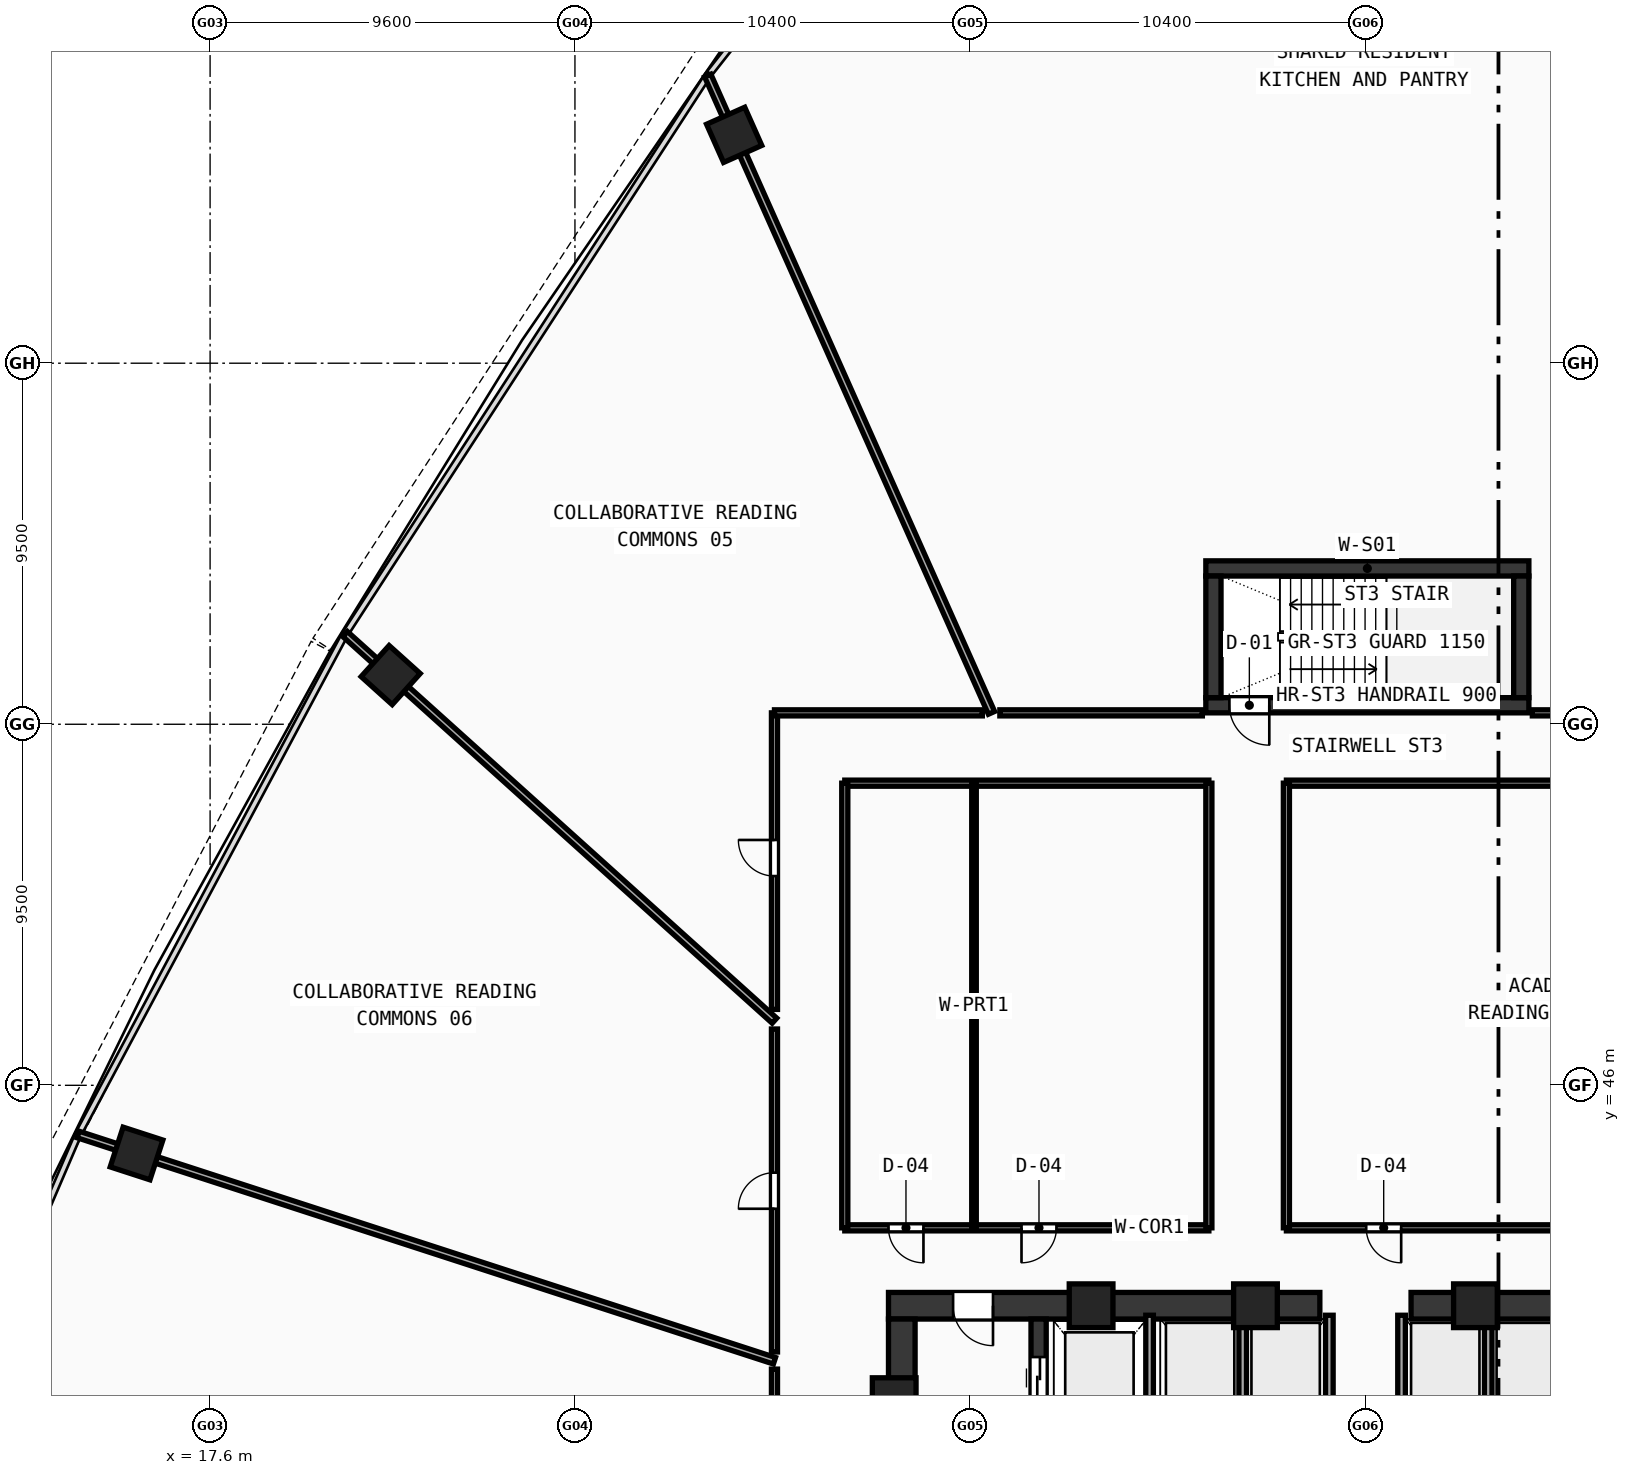
"""IFC4 building model, lengths in metres.
Left out: names, types, materials, properties, quantities, classifications, styles, units other than length and angle.
Written with IfcOpenShell. Run it as: python <this file> out.ifc"""

import sys

from ifc_helpers import new_model, si_unit, direction, frame, frame_2d, origin, origin_with_axes, origin_2d, place, context, subcontext, project, spatial, rectangle, hollow_rectangle, extrude, source, transform, mapped, element, fill, save


model = new_model("IFC4")
c1 = context("Model", 3, precision=1e-05, world=origin(), true_north=direction((0.0, 1.0)))
c2 = subcontext(c1, "Body", "Model", "MODEL_VIEW")
j1 = project(units=[si_unit("LENGTHUNIT", "METRE"), si_unit("PLANEANGLEUNIT", "RADIAN")], contexts=[c1])
p1 = place(None, origin())
s1 = spatial("IfcSite", under=j1, at=p1, CompositionType="ELEMENT")
p2 = place(p1, origin())
s2 = spatial("IfcBuilding", under=s1, at=p2, CompositionType="ELEMENT")
p3 = place(p2, frame((0.0, 0.0, 41.29)))
s3 = spatial("IfcBuildingStorey", under=s2, at=p3, CompositionType="ELEMENT", Elevation=41.29)
p4 = place(p3, frame((35.45, 40.2, 0.0), z_axis=(0.0, 0.0, 1.0), x_axis=(1.0, 0.0, 0.0)))
e1 = element("IfcWall", 1, at=p4, inside=s3, PredefinedType="SHEAR", context=c2, shape_type="SweptSolid", body=[
    extrude(rectangle(XDim=11.35, YDim=0.7, at=frame_2d((5.675, 0.0))), origin(), (0.0, 0.0, 1.0), 3.37),
])
p5 = place(p4, frame((1.7, 0.0, 0.0)))
e2 = element("IfcOpeningElement", 2, at=p5, cuts=e1, PredefinedType="OPENING", context=c2, shape_type="SweptSolid", body=[
    extrude(rectangle(XDim=1.05, YDim=2.1, at=frame_2d((0.525, 1.05))), frame((0.0, 0.36, 0.0), z_axis=(0.0, -1.0, 0.0), x_axis=(1.0, 0.0, 0.0)), (0.0, 0.0, 1.0), 0.72),
])
p6 = place(p3, frame((49.2, 40.2, 0.0), z_axis=(0.0, 0.0, 1.0), x_axis=(1.0, 0.0, 0.0)))
e3 = element("IfcWall", 3, at=p6, inside=s3, PredefinedType="SHEAR", context=c2, shape_type="SweptSolid", body=[
    extrude(rectangle(XDim=11.35, YDim=0.7, at=frame_2d((5.675, 0.0))), origin(), (0.0, 0.0, 1.0), 3.37),
])
p7 = place(p6, frame((8.6, 0.0, 0.0)))
e4 = element("IfcOpeningElement", 4, at=p7, cuts=e3, PredefinedType="OPENING", context=c2, shape_type="SweptSolid", body=[
    extrude(rectangle(XDim=1.05, YDim=2.1, at=frame_2d((0.525, 1.05))), frame((0.0, 0.36, 0.0), z_axis=(0.0, -1.0, 0.0), x_axis=(1.0, 0.0, 0.0)), (0.0, 0.0, 1.0), 0.72),
])
p8 = place(p3, frame((35.8, 27.85, 0.0), z_axis=(0.0, 0.0, 1.0), x_axis=(0.0, 1.0, 0.0)))
e5 = element("IfcWall", 5, at=p8, inside=s3, PredefinedType="SHEAR", context=c2, shape_type="SweptSolid", body=[
    extrude(rectangle(XDim=12.0, YDim=0.7, at=frame_2d((6.0, 0.0))), origin(), (0.0, 0.0, 1.0), 3.37),
])
p9 = place(p3, frame((39.4, 27.85, 0.0), z_axis=(0.0, 0.0, 1.0), x_axis=(0.0, 1.0, 0.0)))
e6 = element("IfcWall", 6, at=p9, inside=s3, PredefinedType="SHEAR", context=c2, shape_type="SweptSolid", body=[
    extrude(rectangle(XDim=12.0, YDim=0.4, at=frame_2d((6.0, 0.0))), origin(), (0.0, 0.0, 1.0), 3.37),
])
p10 = place(p9, frame((9.9, 0.0, 0.0)))
e7 = element("IfcOpeningElement", 7, at=p10, cuts=e6, PredefinedType="OPENING", context=c2, shape_type="SweptSolid", body=[
    extrude(rectangle(XDim=1.1, YDim=2.1, at=frame_2d((0.55, 1.05))), frame((0.0, 0.21, 0.0), z_axis=(0.0, -1.0, 0.0), x_axis=(1.0, 0.0, 0.0)), (0.0, 0.0, 1.0), 0.42),
])
p11 = place(p3, frame((43.8, 59.6, 0.0), z_axis=(0.0, 0.0, 1.0), x_axis=(1.0, 0.0, 0.0)))
e8 = element("IfcWall", 8, at=p11, inside=s3, PredefinedType="SHEAR", context=c2, shape_type="SweptSolid", body=[
    extrude(rectangle(XDim=8.5, YDim=0.4, at=frame_2d((4.25, 0.0))), origin(), (0.0, 0.0, 1.0), 3.37),
])
p12 = place(p3, frame((43.8, 56.0, 0.0), z_axis=(0.0, 0.0, 1.0), x_axis=(1.0, 0.0, 0.0)))
e9 = element("IfcWall", 9, at=p12, inside=s3, PredefinedType="SHEAR", context=c2, shape_type="SweptSolid", body=[
    extrude(rectangle(XDim=8.5, YDim=0.4, at=frame_2d((4.25, 0.0))), origin(), (0.0, 0.0, 1.0), 3.37),
])
p13 = place(p12, frame((0.62, 0.0, 0.0)))
e10 = element("IfcOpeningElement", 10, at=p13, cuts=e9, PredefinedType="OPENING", context=c2, shape_type="SweptSolid", body=[
    extrude(rectangle(XDim=1.05, YDim=2.1, at=frame_2d((0.525, 1.05))), frame((0.0, 0.21, 0.0), z_axis=(0.0, -1.0, 0.0), x_axis=(1.0, 0.0, 0.0)), (0.0, 0.0, 1.0), 0.42),
])
for number, where, z_axis, x_axis in (
    (11, (44.0, 56.2, 0.0), (0.0, 0.0, 1.0), (0.0, 1.0, 0.0)),
    (12, (52.1, 56.2, 0.0), (0.0, 0.0, 1.0), (0.0, 1.0, 0.0)),
):
    element("IfcWall", number, at=place(p3, frame(where, z_axis=z_axis, x_axis=x_axis)), inside=s3, PredefinedType="SHEAR", context=c2, shape_type="SweptSolid", body=[
        extrude(rectangle(XDim=3.2, YDim=0.4, at=frame_2d((1.6, 0.0))), origin(), (0.0, 0.0, 1.0), 3.37),
    ])
m1 = source(origin(), c2, "Body", "SweptSolid", [
    extrude(hollow_rectangle(XDim=1.15, YDim=1.15, WallThickness=0.048, at=origin_2d()), origin(), (0.0, 0.0, 1.0), 3.63),
])
for number, where, z_axis, x_axis in (
    (13, (50.894, 40.2, -0.26), (0.0, 0.0, 1.0), (1.0, 0.0, 0.0)),
    (14, (45.106, 40.2, -0.26), (0.0, 0.0, 1.0), (1.0, 0.0, 0.0)),
    (15, (40.781, 40.2, -0.26), (0.0, 0.0, 1.0), (1.0, 0.0, 0.0)),
    (16, (35.6, 37.729, -0.26), (0.0, 0.0, 1.0), (1.0, 0.0, 0.0)),
):
    element("IfcColumn", number, at=place(p3, frame(where, z_axis=z_axis, x_axis=x_axis)), inside=s3, PredefinedType="COLUMN", context=c2, shape_type="MappedRepresentation", body=[
        mapped(m1, transform((0.0, 0.0, 0.0), scale=1.0)),
    ])
m2 = source(origin(), c2, "Body", "SweptSolid", [
    extrude(hollow_rectangle(XDim=1.1, YDim=1.1, WallThickness=0.045, at=origin_2d()), origin(), (0.0, 0.0, 1.0), 3.63),
])
for number, where, z_axis, x_axis in (
    (17, (31.389, 71.009, -0.26), (0.0, 0.0, 1.0), (-0.914, -0.407, 0.0)),
    (18, (22.351, 56.794, -0.26), (0.0, 0.0, 1.0), (-0.669, -0.743, 0.0)),
    (19, (15.665, 44.206, -0.26), (0.0, 0.0, 1.0), (-0.309, -0.951, 0.0)),
):
    element("IfcColumn", number, at=place(p3, frame(where, z_axis=z_axis, x_axis=x_axis)), inside=s3, PredefinedType="COLUMN", context=c2, shape_type="MappedRepresentation", body=[
        mapped(m2, transform((0.0, 0.0, 0.0), scale=1.0)),
    ])
p14 = place(p3, frame((42.32, 33.5, 0.0), z_axis=(0.0, 0.0, 1.0), x_axis=(0.0, 1.0, 0.0)))
e20 = element("IfcWall", 20, at=p14, inside=s3, PredefinedType="SOLIDWALL", context=c2, shape_type="SweptSolid", body=[
    extrude(rectangle(XDim=6.45, YDim=0.2, at=frame_2d((3.225, 0.0))), origin(), (0.0, 0.0, 1.0), 3.37),
])
p15 = place(p14, frame((1.0, 0.0, 0.0)))
e21 = element("IfcOpeningElement", 21, at=p15, cuts=e20, PredefinedType="OPENING", context=c2, shape_type="SweptSolid", body=[
    extrude(rectangle(XDim=1.05, YDim=2.1, at=frame_2d((0.525, 1.05))), frame((0.0, 0.11, 0.0), z_axis=(0.0, -1.0, 0.0), x_axis=(1.0, 0.0, 0.0)), (0.0, 0.0, 1.0), 0.22),
])
for number, where, z_axis, x_axis in (
    (22, (47.05, 37.32, 0.0), (0.0, 0.0, 1.0), (0.0, 1.0, 0.0)),
    (23, (48.95, 37.32, 0.0), (0.0, 0.0, 1.0), (0.0, 1.0, 0.0)),
    (24, (44.77, 37.32, 0.0), (0.0, 0.0, 1.0), (0.0, 1.0, 0.0)),
    (25, (51.23, 37.32, 0.0), (0.0, 0.0, 1.0), (0.0, 1.0, 0.0)),
):
    element("IfcWall", number, at=place(p3, frame(where, z_axis=z_axis, x_axis=x_axis)), inside=s3, PredefinedType="SOLIDWALL", context=c2, shape_type="SweptSolid", body=[
        extrude(rectangle(XDim=2.63, YDim=0.2, at=frame_2d((1.315, 0.0))), origin(), (0.0, 0.0, 1.0), 3.37),
    ])
p16 = place(p3, frame((34.3, 42.25, 0.0), z_axis=(0.0, 0.0, 1.0), x_axis=(1.0, 0.0, 0.0)))
e26 = element("IfcWall", 26, at=p16, inside=s3, PredefinedType="PARTITIONING", context=c2, shape_type="SweptSolid", body=[
    extrude(rectangle(XDim=9.58, YDim=0.16, at=frame_2d((4.79, 0.0))), origin(), (0.0, 0.0, 1.0), 2.67),
])
p17 = place(p16, frame((1.15, 0.0, 0.0)))
e27 = element("IfcOpeningElement", 27, at=p17, cuts=e26, PredefinedType="OPENING", context=c2, shape_type="SweptSolid", body=[
    extrude(rectangle(XDim=0.92, YDim=2.1, at=frame_2d((0.46, 1.05))), frame((0.0, 0.09, 0.0), z_axis=(0.0, -1.0, 0.0), x_axis=(1.0, 0.0, 0.0)), (0.0, 0.0, 1.0), 0.18),
])
p18 = place(p16, frame((4.65, 0.0, 0.0)))
e28 = element("IfcOpeningElement", 28, at=p18, cuts=e26, PredefinedType="OPENING", context=c2, shape_type="SweptSolid", body=[
    extrude(rectangle(XDim=0.92, YDim=2.1, at=frame_2d((0.46, 1.05))), frame((0.0, 0.09, 0.0), z_axis=(0.0, -1.0, 0.0), x_axis=(1.0, 0.0, 0.0)), (0.0, 0.0, 1.0), 0.18),
])
p19 = place(p3, frame((34.3, 53.95, 0.0), z_axis=(0.0, 0.0, 1.0), x_axis=(1.0, 0.0, 0.0)))
e29 = element("IfcWall", 29, at=p19, inside=s3, PredefinedType="PARTITIONING", context=c2, shape_type="SweptSolid", body=[
    extrude(rectangle(XDim=9.58, YDim=0.16, at=frame_2d((4.79, 0.0))), origin(), (0.0, 0.0, 1.0), 2.67),
])
for number, where, z_axis, x_axis in (
    (30, (34.3, 42.25, 0.0), (0.0, 0.0, 1.0), (0.0, 1.0, 0.0)),
    (31, (43.88, 42.25, 0.0), (0.0, 0.0, 1.0), (0.0, 1.0, 0.0)),
):
    element("IfcWall", number, at=place(p3, frame(where, z_axis=z_axis, x_axis=x_axis)), inside=s3, PredefinedType="PARTITIONING", context=c2, shape_type="SweptSolid", body=[
        extrude(rectangle(XDim=11.7, YDim=0.16, at=frame_2d((5.85, 0.0))), origin(), (0.0, 0.0, 1.0), 2.67),
    ])
p20 = place(p3, frame((37.7, 42.25, 0.0), z_axis=(0.0, 0.0, 1.0), x_axis=(0.0, 1.0, 0.0)))
e32 = element("IfcWall", 32, at=p20, inside=s3, PredefinedType="PARTITIONING", context=c2, shape_type="SweptSolid", body=[
    extrude(rectangle(XDim=11.7, YDim=0.12, at=frame_2d((5.85, 0.0))), origin(), (0.0, 0.0, 1.0), 2.67),
])
p21 = place(p3, frame((45.92, 42.25, 0.0), z_axis=(0.0, 0.0, 1.0), x_axis=(1.0, 0.0, 0.0)))
e33 = element("IfcWall", 33, at=p21, inside=s3, PredefinedType="PARTITIONING", context=c2, shape_type="SweptSolid", body=[
    extrude(rectangle(XDim=16.43, YDim=0.16, at=frame_2d((8.215, 0.0))), origin(), (0.0, 0.0, 1.0), 2.67),
])
p22 = place(p21, frame((2.1, 0.0, 0.0)))
e34 = element("IfcOpeningElement", 34, at=p22, cuts=e33, PredefinedType="OPENING", context=c2, shape_type="SweptSolid", body=[
    extrude(rectangle(XDim=0.92, YDim=2.1, at=frame_2d((0.46, 1.05))), frame((0.0, 0.09, 0.0), z_axis=(0.0, -1.0, 0.0), x_axis=(1.0, 0.0, 0.0)), (0.0, 0.0, 1.0), 0.18),
])
p23 = place(p21, frame((14.18, 0.0, 0.0)))
e35 = element("IfcOpeningElement", 35, at=p23, cuts=e33, PredefinedType="OPENING", context=c2, shape_type="SweptSolid", body=[
    extrude(rectangle(XDim=0.94, YDim=2.1, at=frame_2d((0.47, 1.05))), frame((0.0, 0.09, 0.0), z_axis=(0.0, -1.0, 0.0), x_axis=(1.0, 0.0, 0.0)), (0.0, 0.0, 1.0), 0.18),
])
p24 = place(p3, frame((45.92, 53.95, 0.0), z_axis=(0.0, 0.0, 1.0), x_axis=(1.0, 0.0, 0.0)))
e36 = element("IfcWall", 36, at=p24, inside=s3, PredefinedType="PARTITIONING", context=c2, shape_type="SweptSolid", body=[
    extrude(rectangle(XDim=16.43, YDim=0.16, at=frame_2d((8.215, 0.0))), origin(), (0.0, 0.0, 1.0), 2.67),
])
p25 = place(p3, frame((45.92, 42.25, 0.0), z_axis=(0.0, 0.0, 1.0), x_axis=(0.0, 1.0, 0.0)))
e37 = element("IfcWall", 37, at=p25, inside=s3, PredefinedType="PARTITIONING", context=c2, shape_type="SweptSolid", body=[
    extrude(rectangle(XDim=11.7, YDim=0.16, at=frame_2d((5.85, 0.0))), origin(), (0.0, 0.0, 1.0), 2.97),
])
p26 = place(p3, frame((38.16, 55.8, 0.0), z_axis=(0.0, 0.0, 1.0), x_axis=(-0.406730734994, 0.913548088067, 0.0)))
e38 = element("IfcWall", 38, at=p26, inside=s3, PredefinedType="PARTITIONING", context=c2, shape_type="SweptSolid", body=[
    extrude(rectangle(XDim=18.356, YDim=0.18, at=frame_2d((9.178, 0.0))), origin(), (0.0, 0.0, 1.0), 2.67),
])
p27 = place(p3, frame((32.45, 47.701, 0.0), z_axis=(0.0, 0.0, 1.0), x_axis=(-0.743155181141, 0.66911910505, 0.0)))
e39 = element("IfcWall", 39, at=p27, inside=s3, PredefinedType="PARTITIONING", context=c2, shape_type="SweptSolid", body=[
    extrude(rectangle(XDim=15.202, YDim=0.18, at=frame_2d((7.601, 0.0))), origin(), (0.0, 0.0, 1.0), 2.67),
])
p28 = place(p3, frame((32.45, 38.752, 0.0), z_axis=(0.0, 0.0, 1.0), x_axis=(-0.951055021268, 0.309021595557, 0.0)))
e40 = element("IfcWall", 40, at=p28, inside=s3, PredefinedType="PARTITIONING", context=c2, shape_type="SweptSolid", body=[
    extrude(rectangle(XDim=19.264, YDim=0.18, at=frame_2d((9.632, 0.0))), origin(), (0.0, 0.0, 1.0), 2.67),
])
p29 = place(p3, frame((32.45, 31.178, 0.0), z_axis=(0.0, 0.0, 1.0), x_axis=(0.0, 1.0, 0.0)))
e41 = element("IfcWall", 41, at=p29, inside=s3, PredefinedType="PARTITIONING", context=c2, shape_type="SweptSolid", body=[
    extrude(rectangle(XDim=7.355, YDim=0.16, at=frame_2d((3.677, 0.0))), origin(), (0.0, 0.0, 1.0), 3.37),
])
p30 = place(p29, frame((3.202, 0.0, 0.0)))
e42 = element("IfcOpeningElement", 42, at=p30, cuts=e41, PredefinedType="OPENING", context=c2, shape_type="SweptSolid", body=[
    extrude(rectangle(XDim=0.95, YDim=2.1, at=frame_2d((0.475, 1.05))), frame((0.0, 0.09, 0.0), z_axis=(0.0, -1.0, 0.0), x_axis=(1.0, 0.0, 0.0)), (0.0, 0.0, 1.0), 0.18),
])
p31 = place(p3, frame((32.45, 38.984, 0.0), z_axis=(0.0, 0.0, 1.0), x_axis=(0.0, 1.0, 0.0)))
e43 = element("IfcWall", 43, at=p31, inside=s3, PredefinedType="PARTITIONING", context=c2, shape_type="SweptSolid", body=[
    extrude(rectangle(XDim=8.498, YDim=0.16, at=frame_2d((4.249, 0.0))), origin(), (0.0, 0.0, 1.0), 2.67),
])
p32 = place(p31, frame((3.768, 0.0, 0.0)))
e44 = element("IfcOpeningElement", 44, at=p32, cuts=e43, PredefinedType="OPENING", context=c2, shape_type="SweptSolid", body=[
    extrude(rectangle(XDim=0.95, YDim=2.1, at=frame_2d((0.475, 1.05))), frame((0.0, 0.09, 0.0), z_axis=(0.0, -1.0, 0.0), x_axis=(1.0, 0.0, 0.0)), (0.0, 0.0, 1.0), 0.18),
])
p33 = place(p3, frame((32.45, 47.997, 0.0), z_axis=(0.0, 0.0, 1.0), x_axis=(0.0, 1.0, 0.0)))
e45 = element("IfcWall", 45, at=p33, inside=s3, PredefinedType="PARTITIONING", context=c2, shape_type="SweptSolid", body=[
    extrude(rectangle(XDim=7.803, YDim=0.16, at=frame_2d((3.901, 0.0))), origin(), (0.0, 0.0, 1.0), 3.37),
])
p34 = place(p33, frame((3.508, 0.0, 0.0)))
e46 = element("IfcOpeningElement", 46, at=p34, cuts=e45, PredefinedType="OPENING", context=c2, shape_type="SweptSolid", body=[
    extrude(rectangle(XDim=0.95, YDim=2.1, at=frame_2d((0.475, 1.05))), frame((0.0, 0.09, 0.0), z_axis=(0.0, -1.0, 0.0), x_axis=(1.0, 0.0, 0.0)), (0.0, 0.0, 1.0), 0.18),
])
p35 = place(p3, frame((32.45, 55.8, 0.0), z_axis=(0.0, 0.0, 1.0), x_axis=(1.0, 0.0, 0.0)))
e47 = element("IfcWall", 47, at=p35, inside=s3, PredefinedType="PARTITIONING", context=c2, shape_type="SweptSolid", body=[
    extrude(rectangle(XDim=5.47, YDim=0.16, at=frame_2d((2.735, 0.0))), origin(), (0.0, 0.0, 1.0), 3.37),
])
p36 = place(p3, frame((38.38, 55.8, 0.0), z_axis=(0.0, 0.0, 1.0), x_axis=(1.0, 0.0, 0.0)))
e48 = element("IfcWall", 48, at=p36, inside=s3, PredefinedType="PARTITIONING", context=c2, shape_type="SweptSolid", body=[
    extrude(rectangle(XDim=5.329, YDim=0.16, at=frame_2d((2.665, 0.0))), origin(), (0.0, 0.0, 1.0), 2.67),
])
p37 = place(p3, frame((52.391, 55.8, 0.0), z_axis=(0.0, 0.0, 1.0), x_axis=(1.0, 0.0, 0.0)))
e49 = element("IfcWall", 49, at=p37, inside=s3, PredefinedType="PARTITIONING", context=c2, shape_type="SweptSolid", body=[
    extrude(rectangle(XDim=11.809, YDim=0.16, at=frame_2d((5.904, 0.0))), origin(), (0.0, 0.0, 1.0), 2.67),
])
p38 = place(p37, frame((5.624, 0.0, 0.0)))
e50 = element("IfcOpeningElement", 50, at=p38, cuts=e49, PredefinedType="OPENING", context=c2, shape_type="SweptSolid", body=[
    extrude(rectangle(XDim=0.95, YDim=2.1, at=frame_2d((0.475, 1.05))), frame((0.0, 0.09, 0.0), z_axis=(0.0, -1.0, 0.0), x_axis=(1.0, 0.0, 0.0)), (0.0, 0.0, 1.0), 0.18),
])
m3 = source(origin(), c2, "Body", "SweptSolid", [
    extrude(rectangle(XDim=1.05, YDim=2.1, at=frame_2d((0.525, 1.05))), frame((0.0, 0.025, 0.0), z_axis=(0.0, -1.0, 0.0), x_axis=(1.0, 0.0, 0.0)), (0.0, 0.0, 1.0), 0.05),
])
p39 = place(p5, frame((1.05, 0.0, 0.0), z_axis=(0.0, 0.0, 1.0), x_axis=(-1.0, 0.0, 0.0)))
e51 = element("IfcDoor", 51, at=p39, inside=s3, OperationType="SINGLE_SWING_LEFT", PredefinedType="DOOR", context=c2, shape_type="MappedRepresentation", body=[
    mapped(m3, transform((0.0, 0.0, 0.0), scale=1.0)),
])
fill(e2, e51)
m4 = source(origin(), c2, "Body", "SweptSolid", [
    extrude(rectangle(XDim=1.1, YDim=2.1, at=frame_2d((0.55, 1.05))), frame((0.0, 0.025, 0.0), z_axis=(0.0, -1.0, 0.0), x_axis=(1.0, 0.0, 0.0)), (0.0, 0.0, 1.0), 0.05),
])
p40 = place(p10, frame((1.1, 0.0, 0.0), z_axis=(0.0, 0.0, 1.0), x_axis=(-1.0, 0.0, 0.0)))
e52 = element("IfcDoor", 52, at=p40, inside=s3, OperationType="DOUBLE_DOOR_SLIDING", PredefinedType="DOOR", context=c2, shape_type="MappedRepresentation", body=[
    mapped(m4, transform((0.0, 0.0, 0.0), scale=1.0)),
])
fill(e7, e52)
p41 = place(p13, frame((1.05, 0.0, 0.0), z_axis=(0.0, 0.0, 1.0), x_axis=(-1.0, 0.0, 0.0)))
e53 = element("IfcDoor", 53, at=p41, inside=s3, OperationType="SINGLE_SWING_LEFT", PredefinedType="DOOR", context=c2, shape_type="MappedRepresentation", body=[
    mapped(m3, transform((0.0, 0.0, 0.0), scale=1.0)),
])
fill(e10, e53)
m5 = source(origin(), c2, "Body", "SweptSolid", [
    extrude(rectangle(XDim=0.92, YDim=2.1, at=frame_2d((0.46, 1.05))), frame((0.0, 0.025, 0.0), z_axis=(0.0, -1.0, 0.0), x_axis=(1.0, 0.0, 0.0)), (0.0, 0.0, 1.0), 0.05),
])
p42 = place(p17, frame((0.92, 0.0, 0.0), z_axis=(0.0, 0.0, 1.0), x_axis=(-1.0, 0.0, 0.0)))
e54 = element("IfcDoor", 54, at=p42, inside=s3, OperationType="SINGLE_SWING_LEFT", PredefinedType="DOOR", context=c2, shape_type="MappedRepresentation", body=[
    mapped(m5, transform((0.0, 0.0, 0.0), scale=1.0)),
])
fill(e27, e54)
p43 = place(p18, frame((0.92, 0.0, 0.0), z_axis=(0.0, 0.0, 1.0), x_axis=(-1.0, 0.0, 0.0)))
e55 = element("IfcDoor", 55, at=p43, inside=s3, OperationType="SINGLE_SWING_RIGHT", PredefinedType="DOOR", context=c2, shape_type="MappedRepresentation", body=[
    mapped(m5, transform((0.0, 0.0, 0.0), scale=1.0)),
])
fill(e28, e55)
p44 = place(p22, frame((0.92, 0.0, 0.0), z_axis=(0.0, 0.0, 1.0), x_axis=(-1.0, 0.0, 0.0)))
e56 = element("IfcDoor", 56, at=p44, inside=s3, OperationType="SINGLE_SWING_LEFT", PredefinedType="DOOR", context=c2, shape_type="MappedRepresentation", body=[
    mapped(m5, transform((0.0, 0.0, 0.0), scale=1.0)),
])
fill(e34, e56)
m6 = source(origin(), c2, "Body", "SweptSolid", [
    extrude(rectangle(XDim=0.95, YDim=2.1, at=frame_2d((0.475, 1.05))), frame((0.0, 0.025, 0.0), z_axis=(0.0, -1.0, 0.0), x_axis=(1.0, 0.0, 0.0)), (0.0, 0.0, 1.0), 0.05),
])
p45 = place(p34, origin_with_axes())
e57 = element("IfcDoor", 57, at=p45, inside=s3, OperationType="SINGLE_SWING_RIGHT", PredefinedType="DOOR", context=c2, shape_type="MappedRepresentation", body=[
    mapped(m6, transform((0.0, 0.0, 0.0), scale=1.0)),
])
fill(e46, e57)
p46 = place(p32, origin_with_axes())
e58 = element("IfcDoor", 58, at=p46, inside=s3, OperationType="SINGLE_SWING_LEFT", PredefinedType="DOOR", context=c2, shape_type="MappedRepresentation", body=[
    mapped(m6, transform((0.0, 0.0, 0.0), scale=1.0)),
])
fill(e44, e58)
save(model, sys.argv[1])
